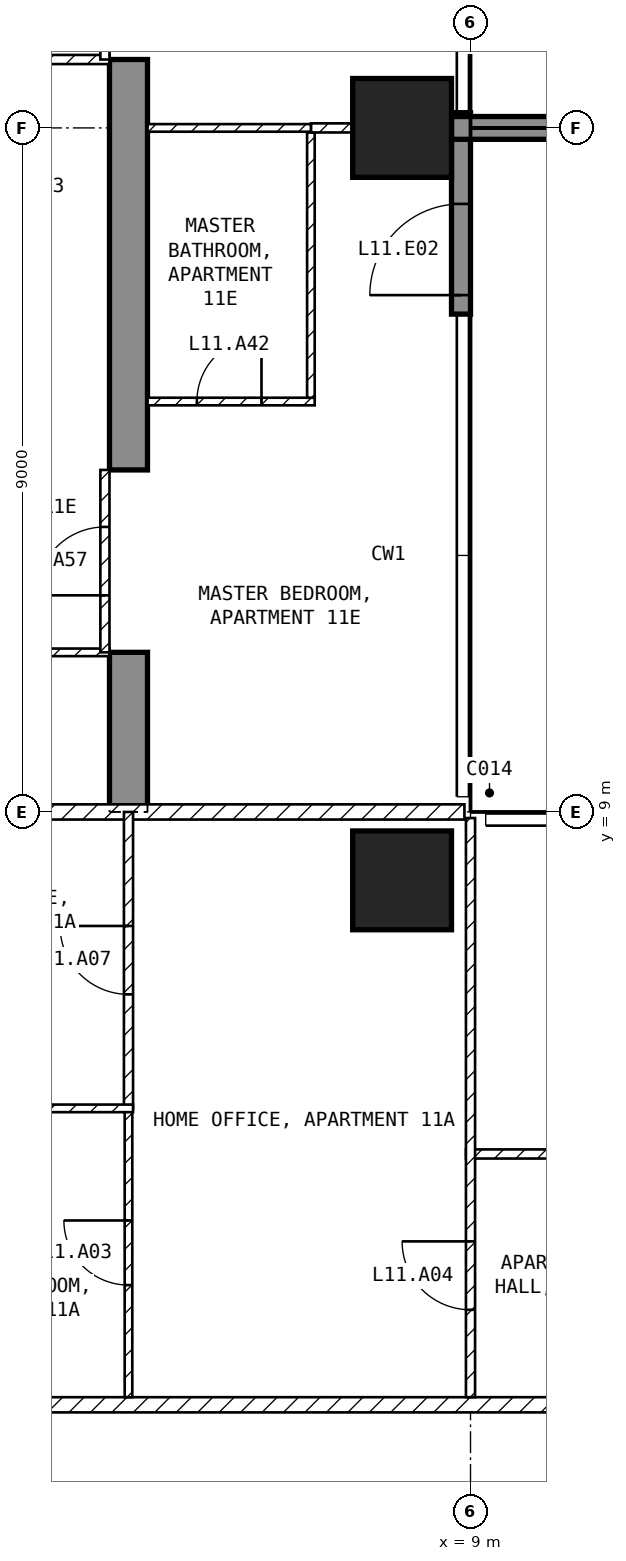
"""IFC4 building model, lengths in metres.
Left out: names, types, materials, properties, quantities, classifications, styles, units other than length and angle.
Written with IfcOpenShell. Run it as: python <this file> out.ifc"""

import sys

from ifc_helpers import new_model, si_unit, direction, frame, frame_2d, origin, origin_2d, place, context, subcontext, project, spatial, polyline, rectangle, outline, extrude, element, fill, save


model = new_model("IFC4")
c1 = context("Model", 3, precision=1e-05, world=origin(), true_north=direction((0.0, 1.0)))
c2 = subcontext(c1, "Body", "Model", "MODEL_VIEW")
j1 = project(units=[si_unit("LENGTHUNIT", "METRE"), si_unit("PLANEANGLEUNIT", "RADIAN")], contexts=[c1])
p1 = place(None, origin())
s1 = spatial("IfcSite", under=j1, at=p1, CompositionType="ELEMENT")
p2 = place(p1, origin())
s2 = spatial("IfcBuilding", under=s1, at=p2, CompositionType="ELEMENT")
p3 = place(p2, frame((0.0, 0.0, 57.5)))
s3 = spatial("IfcBuildingStorey", under=s2, at=p3, CompositionType="ELEMENT", Elevation=57.5)
for number, where, z_axis, x_axis in (
    (1, (8.1, 8.1, -0.25), (0.0, 0.0, 1.0), (1.0, 0.0, 0.0)),
    (2, (8.1, 18.0, -0.25), (0.0, 0.0, 1.0), (1.0, 0.0, 0.0)),
):
    element("IfcColumn", number, at=place(p3, frame(where, z_axis=z_axis, x_axis=x_axis)), inside=s3, PredefinedType="COLUMN", context=c2, shape_type="SweptSolid", body=[
        extrude(rectangle(XDim=1.3, YDim=1.3, at=origin_2d()), origin(), (0.0, 0.0, 1.0), 3.5),
    ])
p4 = place(p3, frame((4.25, 9.0, -0.25), z_axis=(1.0, 0.0, 0.0), x_axis=(0.0, 1.0, 0.0)))
e3 = element("IfcWall", 3, at=p4, inside=s3, PredefinedType="SHEAR", context=c2, shape_type="SweptSolid", body=[
    extrude(outline(polyline([(0.0, 0.0), (2.1, 0.0), (2.1, 2.65), (4.5, 2.65), (4.5, 0.0), (9.9, 0.0), (9.9, 2.65), (12.3, 2.65), (12.3, 0.0), (16.45, 0.0), (16.45, 3.5), (0.0, 3.5), (0.0, 0.0)])), origin(), (0.0, 0.0, 1.0), 0.5),
])
p5 = place(p3, frame((8.875, 15.55, 0.0), z_axis=(0.0, 0.0, 1.0), x_axis=(0.0, 1.0, 0.0)))
e4 = element("IfcWall", 4, at=p5, inside=s3, PredefinedType="SOLIDWALL", context=c2, shape_type="SweptSolid", body=[
    extrude(rectangle(XDim=2.65, YDim=0.25, at=frame_2d((1.325, 0.0))), origin(), (0.0, 0.0, 1.0), 3.25),
])
p6 = place(p5, frame((0.25, 0.0, 0.0)))
e5 = element("IfcOpeningElement", 5, at=p6, cuts=e4, PredefinedType="OPENING", context=c2, shape_type="SweptSolid", body=[
    extrude(rectangle(XDim=1.2, YDim=2.4, at=frame_2d((0.6, 1.2))), frame((0.0, 0.135, 0.0), z_axis=(0.0, -1.0, 0.0), x_axis=(1.0, 0.0, 0.0)), (0.0, 0.0, 1.0), 0.27),
])
p7 = place(p3, frame((8.75, 18.0, 0.0), z_axis=(0.0, 0.0, 1.0), x_axis=(1.0, 0.0, 0.0)))
e6 = element("IfcWall", 6, at=p7, inside=s3, PredefinedType="SOLIDWALL", context=c2, shape_type="SweptSolid", body=[
    extrude(rectangle(XDim=2.95, YDim=0.3, at=frame_2d((1.475, 0.0))), origin(), (0.0, 0.0, 1.0), 3.25),
])
p8 = place(p3, frame((1.1, 1.2, 0.0), z_axis=(0.0, 0.0, 1.0), x_axis=(1.0, 0.0, 0.0)))
e7 = element("IfcWall", 7, at=p8, inside=s3, PredefinedType="PARTITIONING", context=c2, shape_type="SweptSolid", body=[
    extrude(rectangle(XDim=20.5, YDim=0.2, at=frame_2d((10.25, 0.0))), origin(), (0.0, 0.0, 1.0), 3.25),
])
p9 = place(p8, frame((9.2, 0.0, 0.0)))
e8 = element("IfcOpeningElement", 8, at=p9, cuts=e7, PredefinedType="OPENING", context=c2, shape_type="SweptSolid", body=[
    extrude(rectangle(XDim=1.0, YDim=2.1, at=frame_2d((0.5, 1.05))), frame((0.0, 0.11, 0.0), z_axis=(0.0, -1.0, 0.0), x_axis=(1.0, 0.0, 0.0)), (0.0, 0.0, 1.0), 0.22),
])
p10 = place(p3, frame((-8.92, 9.0, 0.0), z_axis=(0.0, 0.0, 1.0), x_axis=(1.0, 0.0, 0.0)))
e9 = element("IfcWall", 9, at=p10, inside=s3, PredefinedType="PARTITIONING", context=c2, shape_type="SweptSolid", body=[
    extrude(rectangle(XDim=17.84, YDim=0.2, at=frame_2d((8.92, 0.0))), origin(), (0.0, 0.0, 1.0), 3.25),
])
p11 = place(p10, frame((8.42, 0.0, 0.0)))
e10 = element("IfcOpeningElement", 10, at=p11, cuts=e9, PredefinedType="OPENING", context=c2, shape_type="SweptSolid", body=[
    extrude(rectangle(XDim=1.0, YDim=2.1, at=frame_2d((0.5, 1.05))), frame((0.0, 0.11, 0.0), z_axis=(0.0, -1.0, 0.0), x_axis=(1.0, 0.0, 0.0)), (0.0, 0.0, 1.0), 0.22),
])
p12 = place(p3, frame((8.94, 4.5, 0.0), z_axis=(0.0, 0.0, 1.0), x_axis=(1.0, 0.0, 0.0)))
e11 = element("IfcWall", 11, at=p12, inside=s3, PredefinedType="PARTITIONING", context=c2, shape_type="SweptSolid", body=[
    extrude(rectangle(XDim=8.46, YDim=0.12, at=frame_2d((4.23, 0.0))), origin(), (0.0, 0.0, 1.0), 3.25),
])
p13 = place(p12, frame((7.11, 0.0, 0.0)))
e12 = element("IfcOpeningElement", 12, at=p13, cuts=e11, PredefinedType="OPENING", context=c2, shape_type="SweptSolid", body=[
    extrude(rectangle(XDim=0.9, YDim=2.1, at=frame_2d((0.45, 1.05))), frame((0.0, 0.07, 0.0), z_axis=(0.0, -1.0, 0.0), x_axis=(1.0, 0.0, 0.0)), (0.0, 0.0, 1.0), 0.14),
])
p14 = place(p12, frame((1.41, 0.0, 0.0)))
e13 = element("IfcOpeningElement", 13, at=p14, cuts=e11, PredefinedType="OPENING", context=c2, shape_type="SweptSolid", body=[
    extrude(rectangle(XDim=0.9, YDim=2.1, at=frame_2d((0.45, 1.05))), frame((0.0, 0.07, 0.0), z_axis=(0.0, -1.0, 0.0), x_axis=(1.0, 0.0, 0.0)), (0.0, 0.0, 1.0), 0.14),
])
p15 = place(p3, frame((9.0, 1.3, 0.0), z_axis=(0.0, 0.0, 1.0), x_axis=(0.0, 1.0, 0.0)))
e14 = element("IfcWall", 14, at=p15, inside=s3, PredefinedType="PARTITIONING", context=c2, shape_type="SweptSolid", body=[
    extrude(rectangle(XDim=7.62, YDim=0.12, at=frame_2d((3.81, 0.0))), origin(), (0.0, 0.0, 1.0), 3.25),
])
p16 = place(p15, frame((1.15, 0.0, 0.0)))
e15 = element("IfcOpeningElement", 15, at=p16, cuts=e14, PredefinedType="OPENING", context=c2, shape_type="SweptSolid", body=[
    extrude(rectangle(XDim=0.9, YDim=2.1, at=frame_2d((0.45, 1.05))), frame((0.0, 0.07, 0.0), z_axis=(0.0, -1.0, 0.0), x_axis=(1.0, 0.0, 0.0)), (0.0, 0.0, 1.0), 0.14),
])
p17 = place(p3, frame((4.5, 1.3, 0.0), z_axis=(0.0, 0.0, 1.0), x_axis=(0.0, 1.0, 0.0)))
e16 = element("IfcWall", 16, at=p17, inside=s3, PredefinedType="PARTITIONING", context=c2, shape_type="SweptSolid", body=[
    extrude(rectangle(XDim=3.8, YDim=0.1, at=frame_2d((1.9, 0.0))), origin(), (0.0, 0.0, 1.0), 3.25),
])
p18 = place(p17, frame((1.475, 0.0, 0.0)))
e17 = element("IfcOpeningElement", 17, at=p18, cuts=e16, PredefinedType="OPENING", context=c2, shape_type="SweptSolid", body=[
    extrude(rectangle(XDim=0.85, YDim=2.1, at=frame_2d((0.425, 1.05))), frame((0.0, 0.06, 0.0), z_axis=(0.0, -1.0, 0.0), x_axis=(1.0, 0.0, 0.0)), (0.0, 0.0, 1.0), 0.12),
])
p19 = place(p3, frame((4.5, 5.1, 0.0), z_axis=(0.0, 0.0, 1.0), x_axis=(0.0, 1.0, 0.0)))
e18 = element("IfcWall", 18, at=p19, inside=s3, PredefinedType="PARTITIONING", context=c2, shape_type="SweptSolid", body=[
    extrude(rectangle(XDim=3.9, YDim=0.12, at=frame_2d((1.95, 0.0))), origin(), (0.0, 0.0, 1.0), 3.25),
])
p20 = place(p19, frame((1.5, 0.0, 0.0)))
e19 = element("IfcOpeningElement", 19, at=p20, cuts=e18, PredefinedType="OPENING", context=c2, shape_type="SweptSolid", body=[
    extrude(rectangle(XDim=0.9, YDim=2.1, at=frame_2d((0.45, 1.05))), frame((0.0, 0.07, 0.0), z_axis=(0.0, -1.0, 0.0), x_axis=(1.0, 0.0, 0.0)), (0.0, 0.0, 1.0), 0.14),
])
p21 = place(p3, frame((1.1, 5.1, 0.0), z_axis=(0.0, 0.0, 1.0), x_axis=(1.0, 0.0, 0.0)))
e20 = element("IfcWall", 20, at=p21, inside=s3, PredefinedType="PARTITIONING", context=c2, shape_type="SweptSolid", body=[
    extrude(rectangle(XDim=3.46, YDim=0.1, at=frame_2d((1.73, 0.0))), origin(), (0.0, 0.0, 1.0), 3.25),
])
p22 = place(p3, frame((2.1, 11.1, 0.0), z_axis=(0.0, 0.0, 1.0), x_axis=(1.0, 0.0, 0.0)))
e21 = element("IfcWall", 21, at=p22, inside=s3, PredefinedType="PARTITIONING", context=c2, shape_type="SweptSolid", body=[
    extrude(rectangle(XDim=2.15, YDim=0.1, at=frame_2d((1.075, 0.0))), origin(), (0.0, 0.0, 1.0), 3.25),
])
p23 = place(p3, frame((-4.25, 18.9, 0.0), z_axis=(0.0, 0.0, 1.0), x_axis=(1.0, 0.0, 0.0)))
e22 = element("IfcWall", 22, at=p23, inside=s3, PredefinedType="PARTITIONING", context=c2, shape_type="SweptSolid", body=[
    extrude(rectangle(XDim=8.5, YDim=0.12, at=frame_2d((4.25, 0.0))), origin(), (0.0, 0.0, 1.0), 3.25),
])
p24 = place(p23, frame((1.925, 0.0, 0.0)))
e23 = element("IfcOpeningElement", 23, at=p24, cuts=e22, PredefinedType="OPENING", context=c2, shape_type="SweptSolid", body=[
    extrude(rectangle(XDim=0.9, YDim=2.1, at=frame_2d((0.45, 1.05))), frame((0.0, 0.07, 0.0), z_axis=(0.0, -1.0, 0.0), x_axis=(1.0, 0.0, 0.0)), (0.0, 0.0, 1.0), 0.14),
])
p25 = place(p3, frame((4.75, 14.4, 0.0), z_axis=(0.0, 0.0, 1.0), x_axis=(1.0, 0.0, 0.0)))
e24 = element("IfcWall", 24, at=p25, inside=s3, PredefinedType="PARTITIONING", context=c2, shape_type="SweptSolid", body=[
    extrude(rectangle(XDim=2.2, YDim=0.1, at=frame_2d((1.1, 0.0))), origin(), (0.0, 0.0, 1.0), 3.25),
])
p26 = place(p25, frame((0.65, 0.0, 0.0)))
e25 = element("IfcOpeningElement", 25, at=p26, cuts=e24, PredefinedType="OPENING", context=c2, shape_type="SweptSolid", body=[
    extrude(rectangle(XDim=0.85, YDim=2.1, at=frame_2d((0.425, 1.05))), frame((0.0, 0.06, 0.0), z_axis=(0.0, -1.0, 0.0), x_axis=(1.0, 0.0, 0.0)), (0.0, 0.0, 1.0), 0.12),
])
p27 = place(p3, frame((6.9, 14.45, 0.0), z_axis=(0.0, 0.0, 1.0), x_axis=(0.0, 1.0, 0.0)))
e26 = element("IfcWall", 26, at=p27, inside=s3, PredefinedType="PARTITIONING", context=c2, shape_type="SweptSolid", body=[
    extrude(rectangle(XDim=3.49, YDim=0.1, at=frame_2d((1.745, 0.0))), origin(), (0.0, 0.0, 1.0), 3.25),
])
p28 = place(p3, frame((6.9, 18.0, 0.0), z_axis=(0.0, 0.0, 1.0), x_axis=(1.0, 0.0, 0.0)))
e27 = element("IfcWall", 27, at=p28, inside=s3, PredefinedType="PARTITIONING", context=c2, shape_type="SweptSolid", body=[
    extrude(rectangle(XDim=0.55, YDim=0.12, at=frame_2d((0.275, 0.0))), origin(), (0.0, 0.0, 1.0), 2.346),
])
p29 = place(p3, frame((4.75, 18.0, 0.0), z_axis=(0.0, 0.0, 1.0), x_axis=(1.0, 0.0, 0.0)))
e28 = element("IfcWall", 28, at=p29, inside=s3, PredefinedType="PARTITIONING", context=c2, shape_type="SweptSolid", body=[
    extrude(rectangle(XDim=2.15, YDim=0.1, at=frame_2d((1.075, 0.0))), origin(), (0.0, 0.0, 1.0), 2.346),
])
p30 = place(p3, frame((4.19, 11.1, 0.0), z_axis=(0.0, 0.0, 1.0), x_axis=(0.0, 1.0, 0.0)))
e29 = element("IfcWall", 29, at=p30, inside=s3, PredefinedType="PARTITIONING", context=c2, shape_type="SweptSolid", body=[
    extrude(rectangle(XDim=2.4, YDim=0.12, at=frame_2d((1.2, 0.0))), origin(), (0.0, 0.0, 1.0), 2.4),
])
p31 = place(p30, frame((0.75, 0.0, 0.0)))
e30 = element("IfcOpeningElement", 30, at=p31, cuts=e29, PredefinedType="OPENING", context=c2, shape_type="SweptSolid", body=[
    extrude(rectangle(XDim=0.9, YDim=2.1, at=frame_2d((0.45, 1.05))), frame((0.0, 0.07, 0.0), z_axis=(0.0, -1.0, 0.0), x_axis=(1.0, 0.0, 0.0)), (0.0, 0.0, 1.0), 0.14),
])
p32 = place(p3, frame((4.19, 18.9, 0.0), z_axis=(0.0, 0.0, 1.0), x_axis=(0.0, 1.0, 0.0)))
e31 = element("IfcWall", 31, at=p32, inside=s3, PredefinedType="PARTITIONING", context=c2, shape_type="SweptSolid", body=[
    extrude(rectangle(XDim=2.4, YDim=0.12, at=frame_2d((1.2, 0.0))), origin(), (0.0, 0.0, 1.0), 2.4),
])
p33 = place(p32, frame((0.55, 0.0, 0.0)))
e32 = element("IfcOpeningElement", 32, at=p33, cuts=e31, PredefinedType="OPENING", context=c2, shape_type="SweptSolid", body=[
    extrude(rectangle(XDim=0.9, YDim=2.1, at=frame_2d((0.45, 1.05))), frame((0.0, 0.07, 0.0), z_axis=(0.0, -1.0, 0.0), x_axis=(1.0, 0.0, 0.0)), (0.0, 0.0, 1.0), 0.14),
])
p34 = place(p6, origin())
e33 = element("IfcDoor", 33, at=p34, inside=s3, OperationType="SINGLE_SWING_LEFT", PredefinedType="DOOR", context=c2, shape_type="SweptSolid", body=[
    extrude(rectangle(XDim=1.2, YDim=2.4, at=frame_2d((0.6, 1.2))), frame((0.0, 0.025, 0.0), z_axis=(0.0, -1.0, 0.0), x_axis=(1.0, 0.0, 0.0)), (0.0, 0.0, 1.0), 0.05),
])
fill(e5, e33)
p35 = place(p18, origin())
e34 = element("IfcDoor", 34, at=p35, inside=s3, OperationType="SINGLE_SWING_RIGHT", PredefinedType="DOOR", context=c2, shape_type="SweptSolid", body=[
    extrude(rectangle(XDim=0.85, YDim=2.1, at=frame_2d((0.425, 1.05))), frame((0.0, 0.025, 0.0), z_axis=(0.0, -1.0, 0.0), x_axis=(1.0, 0.0, 0.0)), (0.0, 0.0, 1.0), 0.05),
])
fill(e17, e34)
p36 = place(p16, origin())
e35 = element("IfcDoor", 35, at=p36, inside=s3, OperationType="SINGLE_SWING_RIGHT", PredefinedType="DOOR", context=c2, shape_type="SweptSolid", body=[
    extrude(rectangle(XDim=0.9, YDim=2.1, at=frame_2d((0.45, 1.05))), frame((0.0, 0.025, 0.0), z_axis=(0.0, -1.0, 0.0), x_axis=(1.0, 0.0, 0.0)), (0.0, 0.0, 1.0), 0.05),
])
fill(e15, e35)
p37 = place(p20, origin())
e36 = element("IfcDoor", 36, at=p37, inside=s3, OperationType="SINGLE_SWING_RIGHT", PredefinedType="DOOR", context=c2, shape_type="SweptSolid", body=[
    extrude(rectangle(XDim=0.9, YDim=2.1, at=frame_2d((0.45, 1.05))), frame((0.0, 0.025, 0.0), z_axis=(0.0, -1.0, 0.0), x_axis=(1.0, 0.0, 0.0)), (0.0, 0.0, 1.0), 0.05),
])
fill(e19, e36)
p38 = place(p26, origin())
e37 = element("IfcDoor", 37, at=p38, inside=s3, OperationType="SINGLE_SWING_RIGHT", PredefinedType="DOOR", context=c2, shape_type="SweptSolid", body=[
    extrude(rectangle(XDim=0.85, YDim=2.1, at=frame_2d((0.425, 1.05))), frame((0.0, 0.025, 0.0), z_axis=(0.0, -1.0, 0.0), x_axis=(1.0, 0.0, 0.0)), (0.0, 0.0, 1.0), 0.05),
])
fill(e25, e37)
p39 = place(p31, origin())
e38 = element("IfcDoor", 38, at=p39, inside=s3, OperationType="SINGLE_SWING_LEFT", PredefinedType="DOOR", context=c2, shape_type="SweptSolid", body=[
    extrude(rectangle(XDim=0.9, YDim=2.1, at=frame_2d((0.45, 1.05))), frame((0.0, 0.025, 0.0), z_axis=(0.0, -1.0, 0.0), x_axis=(1.0, 0.0, 0.0)), (0.0, 0.0, 1.0), 0.05),
])
fill(e30, e38)
save(model, sys.argv[1])
